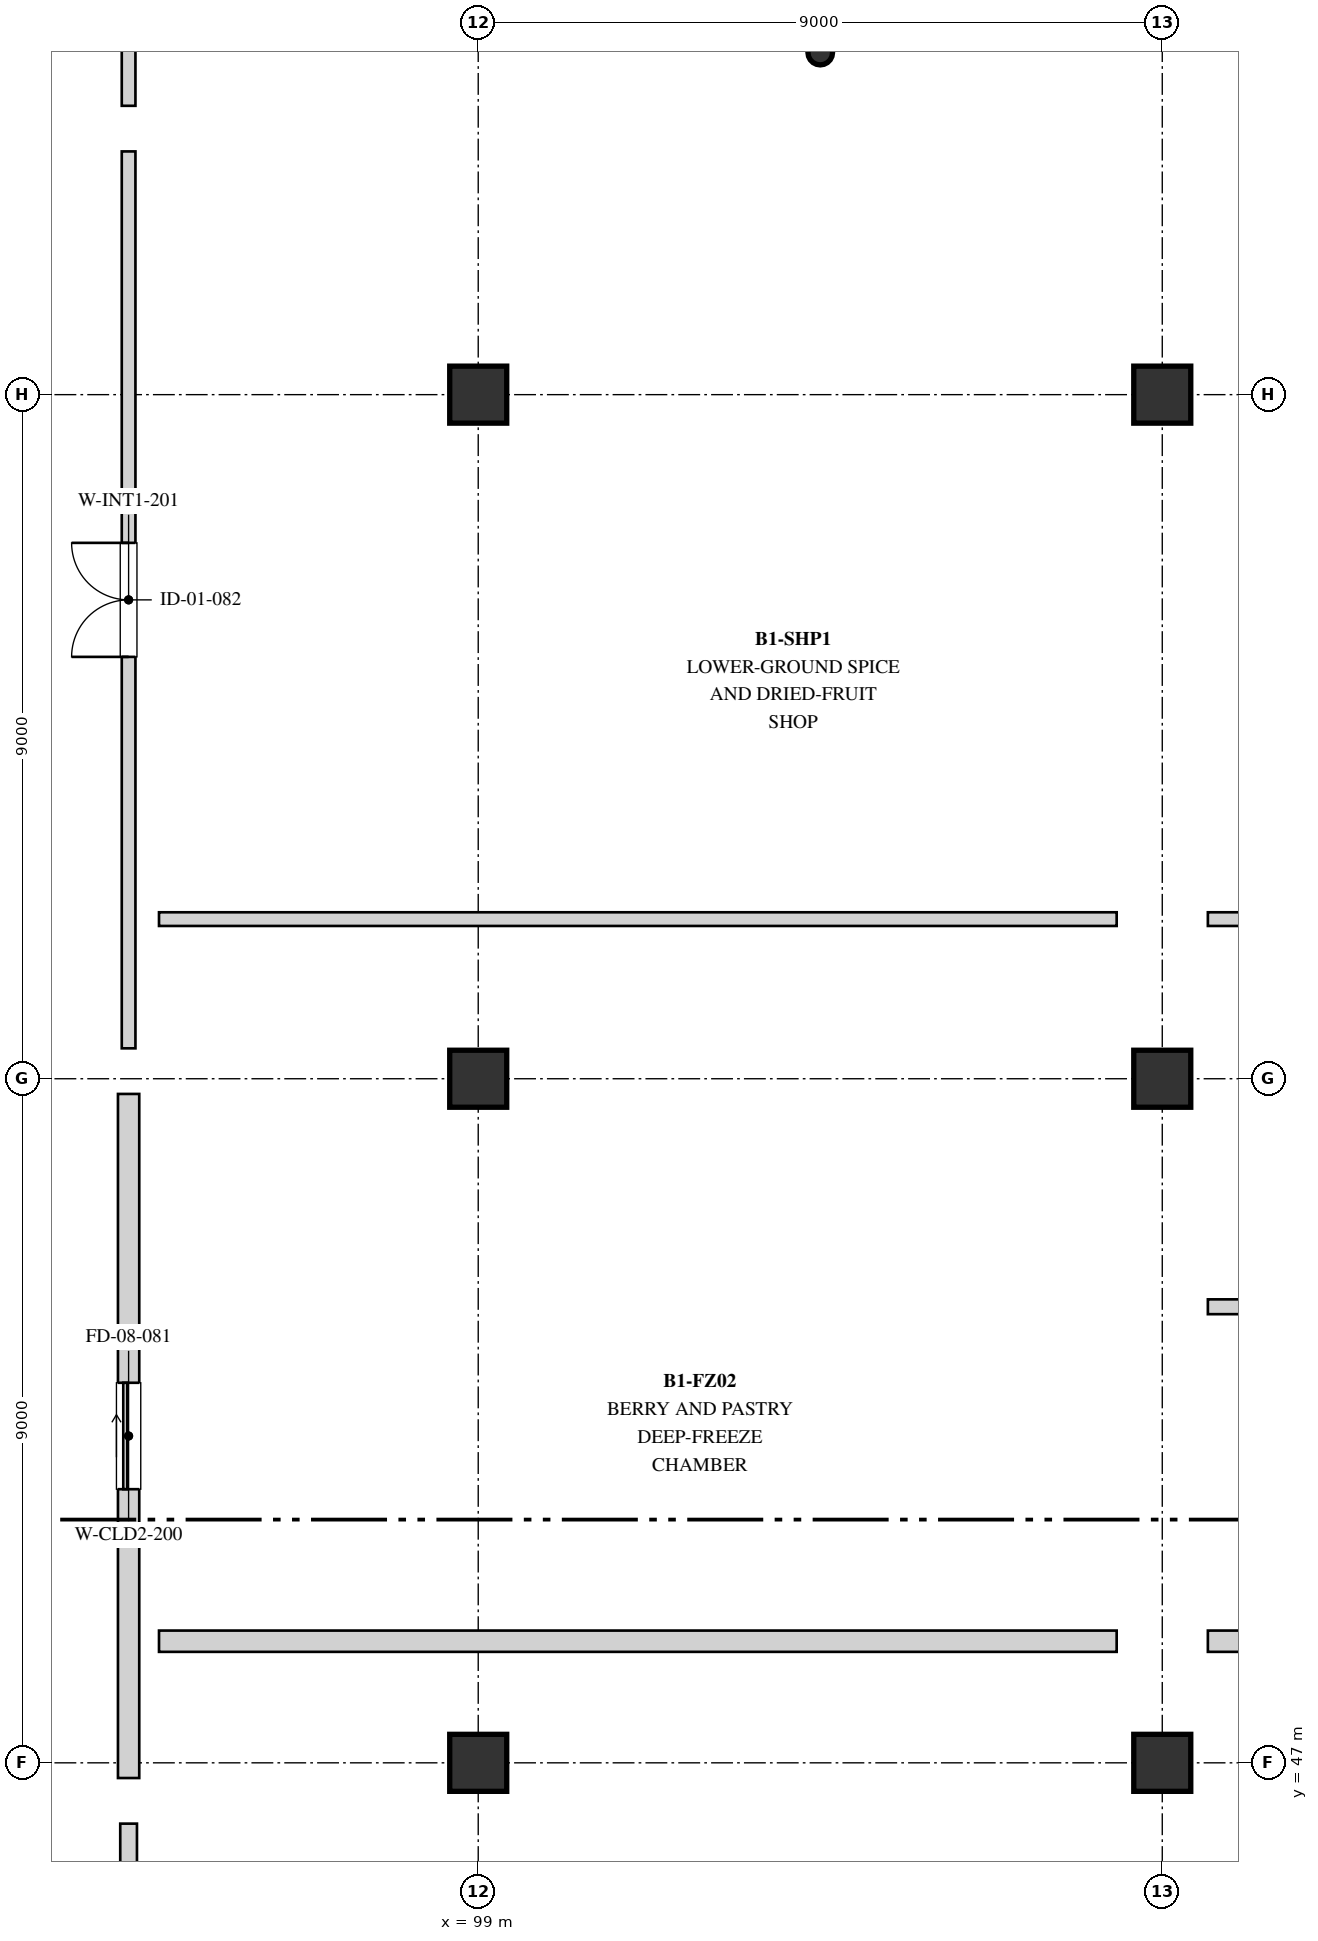
"""IFC4 building model, lengths in metres.
Left out: names, types, materials, properties, quantities, classifications, styles, units other than length and angle.
Written with IfcOpenShell. Run it as: python <this file> out.ifc"""

import sys

from ifc_helpers import new_model, si_unit, direction, frame, frame_2d, origin, origin_2d, place, context, subcontext, project, spatial, rectangle, hollow_circle, extrude, element, fill, save


model = new_model("IFC4")
c1 = context("Model", 3, precision=1e-05, world=origin(), true_north=direction((0.0, 1.0)))
c2 = subcontext(c1, "Body", "Model", "MODEL_VIEW")
j1 = project(units=[si_unit("LENGTHUNIT", "METRE"), si_unit("PLANEANGLEUNIT", "RADIAN")], contexts=[c1])
p1 = place(None, origin())
s1 = spatial("IfcSite", under=j1, at=p1, CompositionType="ELEMENT")
p2 = place(p1, origin())
s2 = spatial("IfcBuilding", under=s1, at=p2, CompositionType="ELEMENT")
p3 = place(p2, frame((0.0, 0.0, -4.2)))
s3 = spatial("IfcBuildingStorey", under=s2, at=p3, CompositionType="ELEMENT", Elevation=-4.2)
for number, where, z_axis, x_axis in (
    (1, (99.0, 47.0, 0.0), (0.0, 0.0, 1.0), (1.0, 0.0, 0.0)),
    (2, (99.0, 56.0, 0.0), (0.0, 0.0, 1.0), (1.0, 0.0, 0.0)),
    (3, (99.0, 65.0, 0.0), (0.0, 0.0, 1.0), (1.0, 0.0, 0.0)),
):
    element("IfcColumn", number, at=place(p3, frame(where, z_axis=z_axis, x_axis=x_axis)), inside=s3, PredefinedType="COLUMN", context=c2, shape_type="SweptSolid", body=[
        extrude(rectangle(XDim=0.75, YDim=0.75, at=origin_2d()), origin(), (0.0, 0.0, 1.0), 3.86),
    ])
for number, where, z_axis, x_axis in (
    (4, (108.0, 47.0, 0.0), (0.0, 0.0, 1.0), (1.0, 0.0, 0.0)),
    (5, (108.0, 56.0, 0.0), (0.0, 0.0, 1.0), (1.0, 0.0, 0.0)),
    (6, (108.0, 65.0, 0.0), (0.0, 0.0, 1.0), (1.0, 0.0, 0.0)),
):
    element("IfcColumn", number, at=place(p3, frame(where, z_axis=z_axis, x_axis=x_axis)), inside=s3, PredefinedType="COLUMN", context=c2, shape_type="SweptSolid", body=[
        extrude(rectangle(XDim=0.75, YDim=0.75, at=origin_2d()), origin(), (0.0, 0.0, 1.0), 4.2),
    ])
p4 = place(p3, frame((103.5, 69.5, 0.0), z_axis=(0.0, 0.0, 1.0), x_axis=(1.0, 0.0, 0.0)))
e7 = element("IfcColumn", 7, at=p4, inside=s3, PredefinedType="PILASTER", context=c2, shape_type="SweptSolid", body=[
    extrude(hollow_circle(Radius=0.162, WallThickness=0.012, at=origin_2d()), origin(), (0.0, 0.0, 1.0), 3.86),
])
p5 = place(p3, frame((94.4, 34.4, 0.0), z_axis=(0.0, 0.0, 1.0), x_axis=(0.0, 1.0, 0.0)))
e8 = element("IfcWall", 8, at=p5, inside=s3, PredefinedType="PARTITIONING", context=c2, shape_type="SweptSolid", body=[
    extrude(rectangle(XDim=11.8, YDim=0.22, at=frame_2d((5.9, 0.0))), origin(), (0.0, 0.0, 1.0), 2.85),
])
p6 = place(p5, frame((5.15, 0.0, 0.0)))
e9 = element("IfcOpeningElement", 9, at=p6, cuts=e8, PredefinedType="OPENING", context=c2, shape_type="SweptSolid", body=[
    extrude(rectangle(XDim=1.5, YDim=2.3, at=frame_2d((0.75, 1.15))), frame((0.0, 0.12, 0.0), z_axis=(0.0, -1.0, 0.0), x_axis=(1.0, 0.0, 0.0)), (0.0, 0.0, 1.0), 0.24),
])
p7 = place(p3, frame((94.4, 46.8, 0.0), z_axis=(0.0, 0.0, 1.0), x_axis=(0.0, 1.0, 0.0)))
e10 = element("IfcWall", 10, at=p7, inside=s3, PredefinedType="PARTITIONING", context=c2, shape_type="SweptSolid", body=[
    extrude(rectangle(XDim=9.0, YDim=0.28, at=frame_2d((4.5, 0.0))), origin(), (0.0, 0.0, 1.0), 2.85),
])
p8 = place(p7, frame((3.8, 0.0, 0.0)))
e11 = element("IfcOpeningElement", 11, at=p8, cuts=e10, PredefinedType="OPENING", context=c2, shape_type="SweptSolid", body=[
    extrude(rectangle(XDim=1.4, YDim=2.25, at=frame_2d((0.7, 1.125))), frame((0.0, 0.15, 0.0), z_axis=(0.0, -1.0, 0.0), x_axis=(1.0, 0.0, 0.0)), (0.0, 0.0, 1.0), 0.3),
])
p9 = place(p3, frame((94.4, 56.4, 0.0), z_axis=(0.0, 0.0, 1.0), x_axis=(0.0, 1.0, 0.0)))
e12 = element("IfcWall", 12, at=p9, inside=s3, PredefinedType="STANDARD", context=c2, shape_type="SweptSolid", body=[
    extrude(rectangle(XDim=11.8, YDim=0.18, at=frame_2d((5.9, 0.0))), origin(), (0.0, 0.0, 1.0), 2.85),
])
p10 = place(p9, frame((5.15, 0.0, 0.0)))
e13 = element("IfcOpeningElement", 13, at=p10, cuts=e12, PredefinedType="OPENING", context=c2, shape_type="SweptSolid", body=[
    extrude(rectangle(XDim=1.5, YDim=2.25, at=frame_2d((0.75, 1.125))), frame((0.0, 0.1, 0.0), z_axis=(0.0, -1.0, 0.0), x_axis=(1.0, 0.0, 0.0)), (0.0, 0.0, 1.0), 0.2),
])
p11 = place(p3, frame((94.4, 68.8, 0.0), z_axis=(0.0, 0.0, 1.0), x_axis=(0.0, 1.0, 0.0)))
e14 = element("IfcWall", 14, at=p11, inside=s3, PredefinedType="STANDARD", context=c2, shape_type="SweptSolid", body=[
    extrude(rectangle(XDim=12.4, YDim=0.18, at=frame_2d((6.2, 0.0))), origin(), (0.0, 0.0, 1.0), 2.85),
])
p12 = place(p11, frame((5.45, 0.0, 0.0)))
e15 = element("IfcOpeningElement", 15, at=p12, cuts=e14, PredefinedType="OPENING", context=c2, shape_type="SweptSolid", body=[
    extrude(rectangle(XDim=1.5, YDim=2.25, at=frame_2d((0.75, 1.125))), frame((0.0, 0.1, 0.0), z_axis=(0.0, -1.0, 0.0), x_axis=(1.0, 0.0, 0.0)), (0.0, 0.0, 1.0), 0.2),
])
p13 = place(p3, frame((94.8, 48.6, 0.0), z_axis=(0.0, 0.0, 1.0), x_axis=(1.0, 0.0, 0.0)))
e16 = element("IfcWall", 16, at=p13, inside=s3, PredefinedType="PARTITIONING", context=c2, shape_type="SweptSolid", body=[
    extrude(rectangle(XDim=12.6, YDim=0.28, at=frame_2d((6.3, 0.0))), origin(), (0.0, 0.0, 1.0), 2.85),
])
p14 = place(p3, frame((108.6, 48.6, 0.0), z_axis=(0.0, 0.0, 1.0), x_axis=(1.0, 0.0, 0.0)))
e17 = element("IfcWall", 17, at=p14, inside=s3, PredefinedType="PARTITIONING", context=c2, shape_type="SweptSolid", body=[
    extrude(rectangle(XDim=15.8, YDim=0.28, at=frame_2d((7.9, 0.0))), origin(), (0.0, 0.0, 1.0), 2.85),
])
p15 = place(p14, frame((3.8, 0.0, 0.0)))
e18 = element("IfcOpeningElement", 18, at=p15, cuts=e17, PredefinedType="OPENING", context=c2, shape_type="SweptSolid", body=[
    extrude(rectangle(XDim=1.4, YDim=2.25, at=frame_2d((0.7, 1.125))), frame((0.0, 0.15, 0.0), z_axis=(0.0, -1.0, 0.0), x_axis=(1.0, 0.0, 0.0)), (0.0, 0.0, 1.0), 0.3),
])
p16 = place(p3, frame((94.8, 58.1, 0.0), z_axis=(0.0, 0.0, 1.0), x_axis=(1.0, 0.0, 0.0)))
e19 = element("IfcWall", 19, at=p16, inside=s3, PredefinedType="STANDARD", context=c2, shape_type="SweptSolid", body=[
    extrude(rectangle(XDim=12.6, YDim=0.18, at=frame_2d((6.3, 0.0))), origin(), (0.0, 0.0, 1.0), 2.85),
])
p17 = place(p3, frame((108.6, 58.1, 0.0), z_axis=(0.0, 0.0, 1.0), x_axis=(1.0, 0.0, 0.0)))
e20 = element("IfcWall", 20, at=p17, inside=s3, PredefinedType="STANDARD", context=c2, shape_type="SweptSolid", body=[
    extrude(rectangle(XDim=15.8, YDim=0.18, at=frame_2d((7.9, 0.0))), origin(), (0.0, 0.0, 1.0), 2.85),
])
p18 = place(p17, frame((7.3, 0.0, 0.0)))
e21 = element("IfcOpeningElement", 21, at=p18, cuts=e20, PredefinedType="OPENING", context=c2, shape_type="SweptSolid", body=[
    extrude(rectangle(XDim=1.2, YDim=2.15, at=frame_2d((0.6, 1.075))), frame((0.0, 0.1, 0.0), z_axis=(0.0, -1.0, 0.0), x_axis=(1.0, 0.0, 0.0)), (0.0, 0.0, 1.0), 0.2),
])
p19 = place(p3, frame((108.6, 53.0, 0.0), z_axis=(0.0, 0.0, 1.0), x_axis=(1.0, 0.0, 0.0)))
e22 = element("IfcWall", 22, at=p19, inside=s3, PredefinedType="PARTITIONING", context=c2, shape_type="SweptSolid", body=[
    extrude(rectangle(XDim=15.8, YDim=0.195, at=frame_2d((7.9, 0.0))), origin(), (0.0, 0.0, 1.0), 2.85),
])
p20 = place(p19, frame((7.4, 0.0, 0.0)))
e23 = element("IfcOpeningElement", 23, at=p20, cuts=e22, PredefinedType="OPENING", context=c2, shape_type="SweptSolid", body=[
    extrude(rectangle(XDim=1.0, YDim=2.1, at=frame_2d((0.5, 1.05))), frame((0.0, 0.107, 0.0), z_axis=(0.0, -1.0, 0.0), x_axis=(1.0, 0.0, 0.0)), (0.0, 0.0, 1.0), 0.215),
])
p21 = place(p8, origin())
e24 = element("IfcDoor", 24, at=p21, inside=s3, OperationType="SLIDING_TO_RIGHT", PredefinedType="DOOR", context=c2, shape_type="SweptSolid", body=[
    extrude(rectangle(XDim=1.4, YDim=2.25, at=frame_2d((0.7, 1.125))), frame((0.0, 0.025, 0.0), z_axis=(0.0, -1.0, 0.0), x_axis=(1.0, 0.0, 0.0)), (0.0, 0.0, 1.0), 0.05),
])
fill(e11, e24)
p22 = place(p10, origin())
e25 = element("IfcDoor", 25, at=p22, inside=s3, OperationType="DOUBLE_DOOR_SINGLE_SWING", PredefinedType="DOOR", context=c2, shape_type="SweptSolid", body=[
    extrude(rectangle(XDim=1.5, YDim=2.25, at=frame_2d((0.75, 1.125))), frame((0.0, 0.025, 0.0), z_axis=(0.0, -1.0, 0.0), x_axis=(1.0, 0.0, 0.0)), (0.0, 0.0, 1.0), 0.05),
])
fill(e13, e25)
save(model, sys.argv[1])
